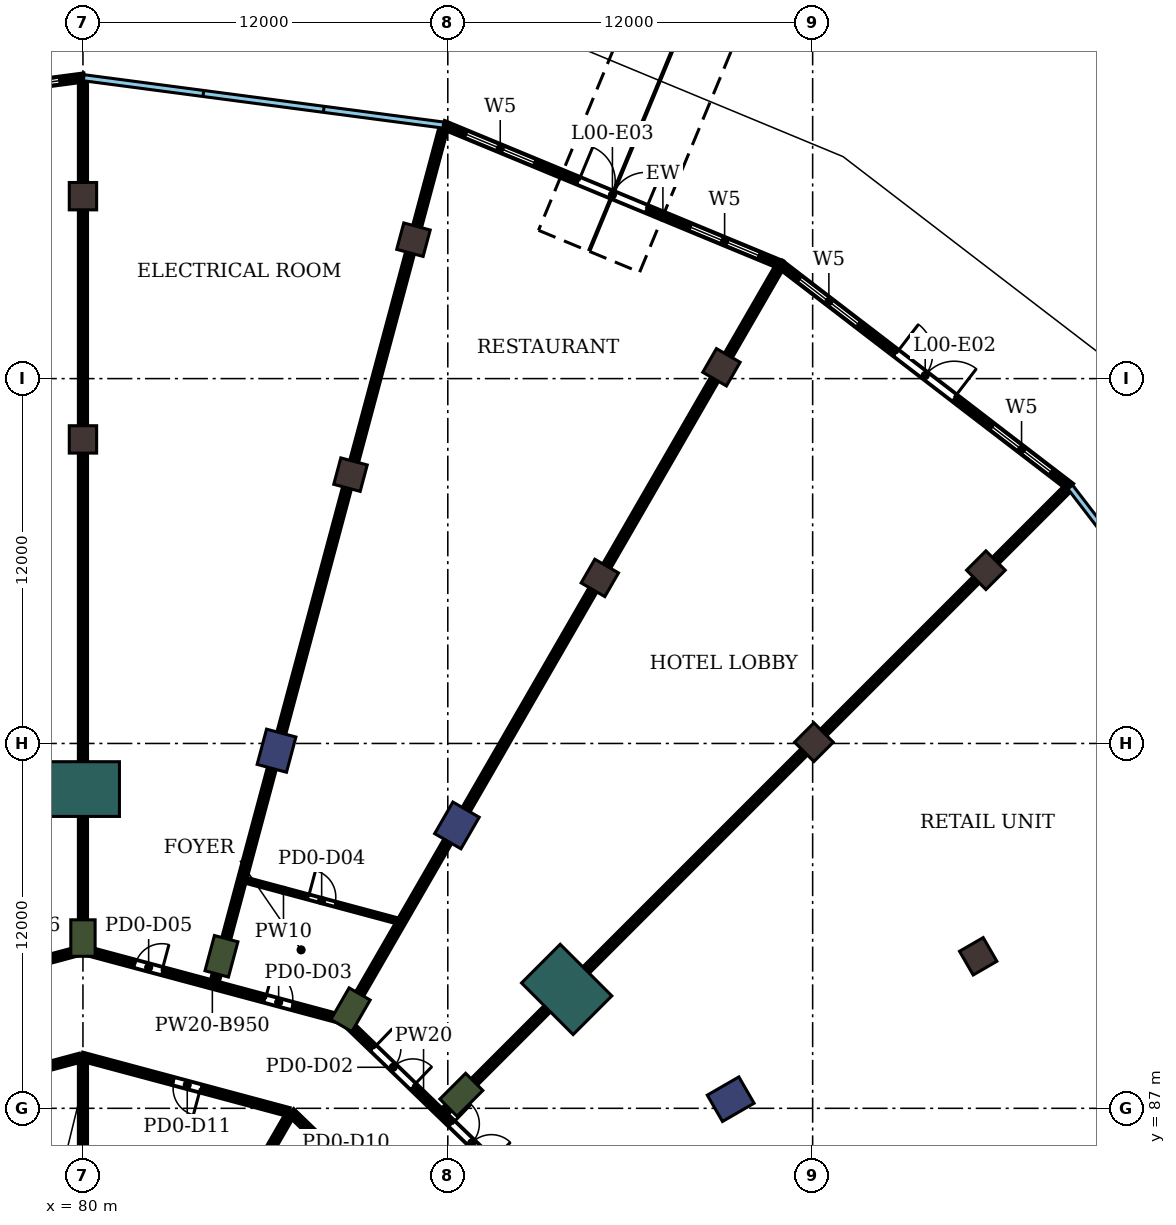
"""IFC4 building model, lengths in metres.
Left out: names, types, materials, properties, quantities, classifications, styles, units other than length and angle.
Written with IfcOpenShell. Run it as: python <this file> out.ifc"""

import sys

from ifc_helpers import new_model, si_unit, direction, frame, frame_2d, origin, origin_2d, place, context, subcontext, project, spatial, rectangle, extrude, element, fill, save


model = new_model("IFC4")
c1 = context("Model", 3, precision=1e-05, world=origin(), true_north=direction((0.0, 1.0)))
c2 = subcontext(c1, "Body", "Model", "MODEL_VIEW")
j1 = project(units=[si_unit("LENGTHUNIT", "METRE"), si_unit("PLANEANGLEUNIT", "RADIAN")], contexts=[c1])
p1 = place(None, origin())
s1 = spatial("IfcSite", under=j1, at=p1, CompositionType="ELEMENT")
p2 = place(p1, origin())
s2 = spatial("IfcBuilding", under=s1, at=p2, CompositionType="ELEMENT")
p3 = place(p2, origin())
s3 = spatial("IfcBuildingStorey", under=s2, at=p3, CompositionType="ELEMENT", Elevation=0.0)
for number, where, z_axis, x_axis in (
    (1, (109.698, 104.698, 0.0), (0.0, 0.0, 1.0), (0.707, 0.707, 0.0)),
    (2, (101.0, 111.373, 0.0), (0.0, 0.0, 1.0), (0.5, 0.866, 0.0)),
    (3, (90.87, 115.569, 0.0), (0.0, 0.0, 1.0), (0.259, 0.966, 0.0)),
    (4, (80.0, 117.0, 0.0), (0.0, 0.0, 1.0), (0.0, 1.0, 0.0)),
    (5, (109.445, 92.0, 0.0), (0.0, 0.0, 1.0), (0.866, 0.5, 0.0)),
    (6, (104.042, 99.042, 0.0), (0.0, 0.0, 1.0), (0.707, 0.707, 0.0)),
    (7, (97.0, 104.445, 0.0), (0.0, 0.0, 1.0), (0.5, 0.866, 0.0)),
    (8, (88.8, 107.842, 0.0), (0.0, 0.0, 1.0), (0.259, 0.966, 0.0)),
    (9, (80.0, 109.0, 0.0), (0.0, 0.0, 1.0), (0.0, 1.0, 0.0)),
):
    element("IfcColumn", number, at=place(p3, frame(where, z_axis=z_axis, x_axis=x_axis)), inside=s3, PredefinedType="COLUMN", context=c2, shape_type="SweptSolid", body=[
        extrude(rectangle(XDim=0.9, YDim=0.9, at=origin_2d()), origin(), (0.0, 0.0, 1.0), 7.0),
    ])
for number, where, z_axis, x_axis in (
    (10, (101.304, 87.3, 0.0), (0.0, 0.0, 1.0), (0.866, 0.5, 0.0)),
    (11, (92.3, 96.304, 0.0), (0.0, 0.0, 1.0), (0.5, 0.866, 0.0)),
    (12, (86.367, 98.762, 0.0), (0.0, 0.0, 1.0), (0.259, 0.966, 0.0)),
):
    element("IfcColumn", number, at=place(p3, frame(where, z_axis=z_axis, x_axis=x_axis)), inside=s3, PredefinedType="COLUMN", context=c2, shape_type="SweptSolid", body=[
        extrude(rectangle(XDim=1.2, YDim=1.0, at=origin_2d()), origin(), (0.0, 0.0, 1.0), 7.0),
    ])
for number, where, z_axis, x_axis in (
    (13, (92.445, 87.445, 0.0), (0.0, 0.0, 1.0), (0.707, 0.707, 0.0)),
    (14, (88.8, 90.242, 0.0), (0.0, 0.0, 1.0), (0.5, 0.866, 0.0)),
    (15, (84.555, 92.0, 0.0), (0.0, 0.0, 1.0), (0.259, 0.966, 0.0)),
    (16, (80.0, 92.6, 0.0), (0.0, 0.0, 1.0), (0.0, 1.0, 0.0)),
):
    element("IfcColumn", number, at=place(p3, frame(where, z_axis=z_axis, x_axis=x_axis)), inside=s3, PredefinedType="COLUMN", context=c2, shape_type="SweptSolid", body=[
        extrude(rectangle(XDim=1.2, YDim=0.8, at=origin_2d()), origin(), (0.0, 0.0, 1.0), 7.0),
    ])
for number, where, z_axis, x_axis in (
    (17, (95.91, 90.91, 0.0), (0.0, 0.0, 1.0), (0.707, 0.707, 0.0)),
    (18, (80.0, 97.5, 0.0), (0.0, 0.0, 1.0), (0.0, 1.0, 0.0)),
):
    element("IfcColumn", number, at=place(p3, frame(where, z_axis=z_axis, x_axis=x_axis)), inside=s3, PredefinedType="COLUMN", context=c2, shape_type="SweptSolid", body=[
        extrude(rectangle(XDim=1.8, YDim=2.4, at=origin_2d()), origin(), (0.0, 0.0, 1.0), 7.0),
    ])
p4 = place(p3, frame((112.456, 107.456, 0.0), z_axis=(0.0, 0.0, 1.0), x_axis=(-0.793357384068, 0.608756159021, 0.0)))
e19 = element("IfcWall", 19, at=p4, inside=s3, PredefinedType="NOTDEFINED", context=c2, shape_type="SweptSolid", body=[
    extrude(rectangle(XDim=11.982, YDim=0.2, at=frame_2d((5.991, 0.0))), origin(), (0.0, 0.0, 1.0), 7.0),
])
p5 = place(p4, frame((0.797, 0.0, 0.9)))
e20 = element("IfcOpeningElement", 20, at=p5, cuts=e19, PredefinedType="OPENING", context=c2, shape_type="SweptSolid", body=[
    extrude(rectangle(XDim=2.4, YDim=3.6, at=frame_2d((1.2, 1.8))), frame((0.0, 0.11, 0.0), z_axis=(0.0, -1.0, 0.0), x_axis=(1.0, 0.0, 0.0)), (0.0, 0.0, 1.0), 0.22),
])
p6 = place(p4, frame((4.791, 0.0, 0.0)))
e21 = element("IfcOpeningElement", 21, at=p6, cuts=e19, PredefinedType="OPENING", context=c2, shape_type="SweptSolid", body=[
    extrude(rectangle(XDim=2.4, YDim=2.7, at=frame_2d((1.2, 1.35))), frame((0.0, 0.11, 0.0), z_axis=(0.0, -1.0, 0.0), x_axis=(1.0, 0.0, 0.0)), (0.0, 0.0, 1.0), 0.22),
])
p7 = place(p4, frame((8.785, 0.0, 0.9)))
e22 = element("IfcOpeningElement", 22, at=p7, cuts=e19, PredefinedType="OPENING", context=c2, shape_type="SweptSolid", body=[
    extrude(rectangle(XDim=2.4, YDim=3.6, at=frame_2d((1.2, 1.8))), frame((0.0, 0.11, 0.0), z_axis=(0.0, -1.0, 0.0), x_axis=(1.0, 0.0, 0.0)), (0.0, 0.0, 1.0), 0.22),
])
p8 = place(p3, frame((102.949, 114.75, 0.0), z_axis=(0.0, 0.0, 1.0), x_axis=(-0.923874283273, 0.382696104901, 0.0)))
e23 = element("IfcWall", 23, at=p8, inside=s3, PredefinedType="NOTDEFINED", context=c2, shape_type="SweptSolid", body=[
    extrude(rectangle(XDim=11.982, YDim=0.2, at=frame_2d((5.991, 0.0))), origin(), (0.0, 0.0, 1.0), 7.0),
])
p9 = place(p8, frame((0.797, 0.0, 0.9)))
e24 = element("IfcOpeningElement", 24, at=p9, cuts=e23, PredefinedType="OPENING", context=c2, shape_type="SweptSolid", body=[
    extrude(rectangle(XDim=2.4, YDim=3.6, at=frame_2d((1.2, 1.8))), frame((0.0, 0.11, 0.0), z_axis=(0.0, -1.0, 0.0), x_axis=(1.0, 0.0, 0.0)), (0.0, 0.0, 1.0), 0.22),
])
p10 = place(p8, frame((4.791, 0.0, 0.0)))
e25 = element("IfcOpeningElement", 25, at=p10, cuts=e23, PredefinedType="OPENING", context=c2, shape_type="SweptSolid", body=[
    extrude(rectangle(XDim=2.4, YDim=2.7, at=frame_2d((1.2, 1.35))), frame((0.0, 0.11, 0.0), z_axis=(0.0, -1.0, 0.0), x_axis=(1.0, 0.0, 0.0)), (0.0, 0.0, 1.0), 0.22),
])
p11 = place(p8, frame((8.785, 0.0, 0.9)))
e26 = element("IfcOpeningElement", 26, at=p11, cuts=e23, PredefinedType="OPENING", context=c2, shape_type="SweptSolid", body=[
    extrude(rectangle(XDim=2.4, YDim=3.6, at=frame_2d((1.2, 1.8))), frame((0.0, 0.11, 0.0), z_axis=(0.0, -1.0, 0.0), x_axis=(1.0, 0.0, 0.0)), (0.0, 0.0, 1.0), 0.22),
])
p12 = place(p3, frame((80.0, 120.899, 0.0), z_axis=(0.0, 0.0, 1.0), x_axis=(-0.991445069361, -0.130524612391, 0.0)))
e27 = element("IfcWall", 27, at=p12, inside=s3, PredefinedType="NOTDEFINED", context=c2, shape_type="SweptSolid", body=[
    extrude(rectangle(XDim=11.982, YDim=0.2, at=frame_2d((5.991, 0.0))), origin(), (0.0, 0.0, 1.0), 7.0),
])
p13 = place(p12, frame((0.797, 0.0, 0.9)))
e28 = element("IfcOpeningElement", 28, at=p13, cuts=e27, PredefinedType="OPENING", context=c2, shape_type="SweptSolid", body=[
    extrude(rectangle(XDim=2.4, YDim=3.6, at=frame_2d((1.2, 1.8))), frame((0.0, 0.11, 0.0), z_axis=(0.0, -1.0, 0.0), x_axis=(1.0, 0.0, 0.0)), (0.0, 0.0, 1.0), 0.22),
])
p14 = place(p12, frame((4.791, 0.0, 0.0)))
e29 = element("IfcOpeningElement", 29, at=p14, cuts=e27, PredefinedType="OPENING", context=c2, shape_type="SweptSolid", body=[
    extrude(rectangle(XDim=2.4, YDim=2.7, at=frame_2d((1.2, 1.35))), frame((0.0, 0.11, 0.0), z_axis=(0.0, -1.0, 0.0), x_axis=(1.0, 0.0, 0.0)), (0.0, 0.0, 1.0), 0.22),
])
p15 = place(p12, frame((8.785, 0.0, 0.9)))
e30 = element("IfcOpeningElement", 30, at=p15, cuts=e27, PredefinedType="OPENING", context=c2, shape_type="SweptSolid", body=[
    extrude(rectangle(XDim=2.4, YDim=3.6, at=frame_2d((1.2, 1.8))), frame((0.0, 0.11, 0.0), z_axis=(0.0, -1.0, 0.0), x_axis=(1.0, 0.0, 0.0)), (0.0, 0.0, 1.0), 0.22),
])
p16 = place(p3, frame((71.411, 89.908, 0.0), z_axis=(0.0, 0.0, 1.0), x_axis=(0.965907314361, 0.258888122678, 0.0)))
e31 = element("IfcWall", 31, at=p16, inside=s3, PredefinedType="PARTITIONING", context=c2, shape_type="SweptSolid", body=[
    extrude(rectangle(XDim=8.802, YDim=0.2, at=frame_2d((4.401, 0.0))), origin(), (0.0, 0.0, 1.0), 6.05),
])
p17 = place(p16, frame((5.755, 0.0, 0.0)))
e32 = element("IfcOpeningElement", 32, at=p17, cuts=e31, PredefinedType="OPENING", context=c2, shape_type="SweptSolid", body=[
    extrude(rectangle(XDim=1.8, YDim=2.1, at=frame_2d((0.9, 1.05))), frame((0.0, 0.11, 0.0), z_axis=(0.0, -1.0, 0.0), x_axis=(1.0, 0.0, 0.0)), (0.0, 0.0, 1.0), 0.22),
])
p18 = place(p16, frame((1.779, 0.0, 0.0)))
e33 = element("IfcOpeningElement", 33, at=p18, cuts=e31, PredefinedType="OPENING", context=c2, shape_type="SweptSolid", body=[
    extrude(rectangle(XDim=0.9, YDim=2.1, at=frame_2d((0.45, 1.05))), frame((0.0, 0.11, 0.0), z_axis=(0.0, -1.0, 0.0), x_axis=(1.0, 0.0, 0.0)), (0.0, 0.0, 1.0), 0.22),
])
p19 = place(p3, frame((73.284, 86.891, 0.0), z_axis=(0.0, 0.0, 1.0), x_axis=(0.965937351185, 0.258776029775, 0.0)))
e34 = element("IfcWall", 34, at=p19, inside=s3, PredefinedType="PARTITIONING", context=c2, shape_type="SweptSolid", body=[
    extrude(rectangle(XDim=6.823, YDim=0.2, at=frame_2d((3.412, 0.0))), origin(), (0.0, 0.0, 1.0), 6.55),
])
p20 = place(p19, frame((2.951, 0.0, 0.0)))
e35 = element("IfcOpeningElement", 35, at=p20, cuts=e34, PredefinedType="OPENING", context=c2, shape_type="SweptSolid", body=[
    extrude(rectangle(XDim=0.9, YDim=2.1, at=frame_2d((0.45, 1.05))), frame((0.0, 0.11, 0.0), z_axis=(0.0, -1.0, 0.0), x_axis=(1.0, 0.0, 0.0)), (0.0, 0.0, 1.0), 0.22),
])
p21 = place(p3, frame((80.0, 82.699, 0.0), z_axis=(0.0, 0.0, 1.0), x_axis=(0.0, 1.0, 0.0)))
e36 = element("IfcWall", 36, at=p21, inside=s3, PredefinedType="PARTITIONING", context=c2, shape_type="SweptSolid", body=[
    extrude(rectangle(XDim=5.861, YDim=0.2, at=frame_2d((2.931, 0.0))), origin(), (0.0, 0.0, 1.0), 6.55),
])
p22 = place(p3, frame((80.0, 88.69, 0.0), z_axis=(0.0, 0.0, 1.0), x_axis=(0.965929896633, -0.258803853893, 0.0)))
e37 = element("IfcWall", 37, at=p22, inside=s3, PredefinedType="PARTITIONING", context=c2, shape_type="SweptSolid", body=[
    extrude(rectangle(XDim=6.963, YDim=0.2, at=frame_2d((3.481, 0.0))), origin(), (0.0, 0.0, 1.0), 6.55),
])
p23 = place(p22, frame((3.102, 0.0, 0.0)))
e38 = element("IfcOpeningElement", 38, at=p23, cuts=e37, PredefinedType="OPENING", context=c2, shape_type="SweptSolid", body=[
    extrude(rectangle(XDim=0.9, YDim=2.1, at=frame_2d((0.45, 1.05))), frame((0.0, 0.11, 0.0), z_axis=(0.0, -1.0, 0.0), x_axis=(1.0, 0.0, 0.0)), (0.0, 0.0, 1.0), 0.22),
])
p24 = place(p3, frame((80.0, 92.3, 0.0), z_axis=(0.0, 0.0, 1.0), x_axis=(0.0, 1.0, 0.0)))
e39 = element("IfcWall", 39, at=p24, inside=s3, PredefinedType="PARTITIONING", context=c2, shape_type="SweptSolid", body=[
    extrude(rectangle(XDim=28.498, YDim=0.2, at=frame_2d((14.249, 0.0))), origin(), (0.0, 0.0, 1.0), 5.65),
])
p25 = place(p3, frame((80.0, 92.21, 0.0), z_axis=(0.0, 0.0, 1.0), x_axis=(0.965910452724, -0.258876413213, 0.0)))
e40 = element("IfcWall", 40, at=p25, inside=s3, PredefinedType="PARTITIONING", context=c2, shape_type="SweptSolid", body=[
    extrude(rectangle(XDim=8.812, YDim=0.2, at=frame_2d((4.406, 0.0))), origin(), (0.0, 0.0, 1.0), 6.05),
])
p26 = place(p25, frame((6.213, 0.0, 0.0)))
e41 = element("IfcOpeningElement", 41, at=p26, cuts=e40, PredefinedType="OPENING", context=c2, shape_type="SweptSolid", body=[
    extrude(rectangle(XDim=0.9, YDim=2.1, at=frame_2d((0.45, 1.05))), frame((0.0, 0.11, 0.0), z_axis=(0.0, -1.0, 0.0), x_axis=(1.0, 0.0, 0.0)), (0.0, 0.0, 1.0), 0.22),
])
p27 = place(p25, frame((1.787, 0.0, 0.0)))
e42 = element("IfcOpeningElement", 42, at=p27, cuts=e40, PredefinedType="OPENING", context=c2, shape_type="SweptSolid", body=[
    extrude(rectangle(XDim=0.9, YDim=2.1, at=frame_2d((0.45, 1.05))), frame((0.0, 0.11, 0.0), z_axis=(0.0, -1.0, 0.0), x_axis=(1.0, 0.0, 0.0)), (0.0, 0.0, 1.0), 0.22),
])
p28 = place(p3, frame((83.85, 81.667, 0.0), z_axis=(0.0, 0.0, 1.0), x_axis=(0.500029580911, 0.866008324564, 0.0)))
e43 = element("IfcWall", 43, at=p28, inside=s3, PredefinedType="PARTITIONING", context=c2, shape_type="SweptSolid", body=[
    extrude(rectangle(XDim=5.872, YDim=0.2, at=frame_2d((2.936, 0.0))), origin(), (0.0, 0.0, 1.0), 6.55),
])
p29 = place(p3, frame((84.33, 91.153, 0.0), z_axis=(0.0, 0.0, 1.0), x_axis=(0.258902156378, 0.965903552858, 0.0)))
e44 = element("IfcWall", 44, at=p29, inside=s3, PredefinedType="PARTITIONING", context=c2, shape_type="SweptSolid", body=[
    extrude(rectangle(XDim=29.074, YDim=0.2, at=frame_2d((14.537, 0.0))), origin(), (0.0, 0.0, 1.0), 5.65),
])
p30 = place(p3, frame((86.861, 86.852, 0.0), z_axis=(0.0, 0.0, 1.0), x_axis=(0.719448855188, -0.694545423114, 0.0)))
e45 = element("IfcWall", 45, at=p30, inside=s3, PredefinedType="PARTITIONING", context=c2, shape_type="SweptSolid", body=[
    extrude(rectangle(XDim=4.97, YDim=0.2, at=frame_2d((2.485, 0.0))), origin(), (0.0, 0.0, 1.0), 6.55),
])
p31 = place(p30, frame((2.035, 0.0, 0.0)))
e46 = element("IfcOpeningElement", 46, at=p31, cuts=e45, PredefinedType="OPENING", context=c2, shape_type="SweptSolid", body=[
    extrude(rectangle(XDim=0.9, YDim=2.1, at=frame_2d((0.45, 1.05))), frame((0.0, 0.11, 0.0), z_axis=(0.0, -1.0, 0.0), x_axis=(1.0, 0.0, 0.0)), (0.0, 0.0, 1.0), 0.22),
])
p32 = place(p3, frame((88.668, 89.832, 0.0), z_axis=(0.0, 0.0, 1.0), x_axis=(0.71956091863, -0.694429322811, 0.0)))
e47 = element("IfcWall", 47, at=p32, inside=s3, PredefinedType="PARTITIONING", context=c2, shape_type="SweptSolid", body=[
    extrude(rectangle(XDim=7.043, YDim=0.2, at=frame_2d((3.521, 0.0))), origin(), (0.0, 0.0, 1.0), 6.55),
])
p33 = place(p32, frame((4.821, 0.0, 0.0)))
e48 = element("IfcOpeningElement", 48, at=p33, cuts=e47, PredefinedType="OPENING", context=c2, shape_type="SweptSolid", body=[
    extrude(rectangle(XDim=1.8, YDim=2.1, at=frame_2d((0.9, 1.05))), frame((0.0, 0.11, 0.0), z_axis=(0.0, -1.0, 0.0), x_axis=(1.0, 0.0, 0.0)), (0.0, 0.0, 1.0), 0.22),
])
p34 = place(p32, frame((1.234, 0.0, 0.0)))
e49 = element("IfcOpeningElement", 49, at=p34, cuts=e47, PredefinedType="OPENING", context=c2, shape_type="SweptSolid", body=[
    extrude(rectangle(XDim=1.8, YDim=2.1, at=frame_2d((0.9, 1.05))), frame((0.0, 0.11, 0.0), z_axis=(0.0, -1.0, 0.0), x_axis=(1.0, 0.0, 0.0)), (0.0, 0.0, 1.0), 0.22),
])
p35 = place(p3, frame((88.602, 89.897, 0.0), z_axis=(0.0, 0.0, 1.0), x_axis=(0.500041462516, 0.866001464066, 0.0)))
e50 = element("IfcWall", 50, at=p35, inside=s3, PredefinedType="PARTITIONING", context=c2, shape_type="SweptSolid", body=[
    extrude(rectangle(XDim=28.596, YDim=0.2, at=frame_2d((14.298, 0.0))), origin(), (0.0, 0.0, 1.0), 5.65),
])
p36 = place(p3, frame((91.876, 86.876, 0.0), z_axis=(0.0, 0.0, 1.0), x_axis=(0.707106781187, 0.707106781187, 0.0)))
e51 = element("IfcWall", 51, at=p36, inside=s3, PredefinedType="PARTITIONING", context=c2, shape_type="SweptSolid", body=[
    extrude(rectangle(XDim=29.004, YDim=0.2, at=frame_2d((14.502, 0.0))), origin(), (0.0, 0.0, 1.0), 5.65),
])
p37 = place(p3, frame((85.34, 94.506, 0.0), z_axis=(0.0, 0.0, 1.0), x_axis=(0.965895847634, -0.258930901058, 0.0)))
e52 = element("IfcWall", 52, at=p37, inside=s3, PredefinedType="PARTITIONING", context=c2, shape_type="SweptSolid", body=[
    extrude(rectangle(XDim=5.199, YDim=0.1, at=frame_2d((2.6, 0.0))), origin(), (0.0, 0.0, 1.0), 6.55),
])
p38 = place(p37, frame((2.149, 0.0, 0.0)))
e53 = element("IfcOpeningElement", 53, at=p38, cuts=e52, PredefinedType="OPENING", context=c2, shape_type="SweptSolid", body=[
    extrude(rectangle(XDim=0.9, YDim=2.1, at=frame_2d((0.45, 1.05))), frame((0.0, 0.06, 0.0), z_axis=(0.0, -1.0, 0.0), x_axis=(1.0, 0.0, 0.0)), (0.0, 0.0, 1.0), 0.12),
])
p39 = place(p5, origin())
e54 = element("IfcWindow", 54, at=p39, inside=s3, PartitioningType="SINGLE_PANEL", PredefinedType="WINDOW", context=c2, shape_type="SweptSolid", body=[
    extrude(rectangle(XDim=2.4, YDim=3.6, at=frame_2d((1.2, 1.8))), frame((0.0, 0.03, 0.0), z_axis=(0.0, -1.0, 0.0), x_axis=(1.0, 0.0, 0.0)), (0.0, 0.0, 1.0), 0.06),
])
fill(e20, e54)
p40 = place(p6, frame((2.4, 0.0, 0.0), z_axis=(0.0, 0.0, 1.0), x_axis=(-1.0, 0.0, 0.0)))
e55 = element("IfcDoor", 55, at=p40, inside=s3, OperationType="DOUBLE_DOOR_SINGLE_SWING", PredefinedType="DOOR", context=c2, shape_type="SweptSolid", body=[
    extrude(rectangle(XDim=2.4, YDim=2.7, at=frame_2d((1.2, 1.35))), frame((0.0, 0.025, 0.0), z_axis=(0.0, -1.0, 0.0), x_axis=(1.0, 0.0, 0.0)), (0.0, 0.0, 1.0), 0.05),
])
fill(e21, e55)
p41 = place(p7, origin())
e56 = element("IfcWindow", 56, at=p41, inside=s3, PartitioningType="SINGLE_PANEL", PredefinedType="WINDOW", context=c2, shape_type="SweptSolid", body=[
    extrude(rectangle(XDim=2.4, YDim=3.6, at=frame_2d((1.2, 1.8))), frame((0.0, 0.03, 0.0), z_axis=(0.0, -1.0, 0.0), x_axis=(1.0, 0.0, 0.0)), (0.0, 0.0, 1.0), 0.06),
])
fill(e22, e56)
p42 = place(p9, origin())
e57 = element("IfcWindow", 57, at=p42, inside=s3, PartitioningType="SINGLE_PANEL", PredefinedType="WINDOW", context=c2, shape_type="SweptSolid", body=[
    extrude(rectangle(XDim=2.4, YDim=3.6, at=frame_2d((1.2, 1.8))), frame((0.0, 0.03, 0.0), z_axis=(0.0, -1.0, 0.0), x_axis=(1.0, 0.0, 0.0)), (0.0, 0.0, 1.0), 0.06),
])
fill(e24, e57)
p43 = place(p10, frame((2.4, 0.0, 0.0), z_axis=(0.0, 0.0, 1.0), x_axis=(-1.0, 0.0, 0.0)))
e58 = element("IfcDoor", 58, at=p43, inside=s3, OperationType="DOUBLE_DOOR_SINGLE_SWING", PredefinedType="DOOR", context=c2, shape_type="SweptSolid", body=[
    extrude(rectangle(XDim=2.4, YDim=2.7, at=frame_2d((1.2, 1.35))), frame((0.0, 0.025, 0.0), z_axis=(0.0, -1.0, 0.0), x_axis=(1.0, 0.0, 0.0)), (0.0, 0.0, 1.0), 0.05),
])
fill(e25, e58)
p44 = place(p11, origin())
e59 = element("IfcWindow", 59, at=p44, inside=s3, PartitioningType="SINGLE_PANEL", PredefinedType="WINDOW", context=c2, shape_type="SweptSolid", body=[
    extrude(rectangle(XDim=2.4, YDim=3.6, at=frame_2d((1.2, 1.8))), frame((0.0, 0.03, 0.0), z_axis=(0.0, -1.0, 0.0), x_axis=(1.0, 0.0, 0.0)), (0.0, 0.0, 1.0), 0.06),
])
fill(e26, e59)
p45 = place(p13, origin())
e60 = element("IfcWindow", 60, at=p45, inside=s3, PartitioningType="SINGLE_PANEL", PredefinedType="WINDOW", context=c2, shape_type="SweptSolid", body=[
    extrude(rectangle(XDim=2.4, YDim=3.6, at=frame_2d((1.2, 1.8))), frame((0.0, 0.03, 0.0), z_axis=(0.0, -1.0, 0.0), x_axis=(1.0, 0.0, 0.0)), (0.0, 0.0, 1.0), 0.06),
])
fill(e28, e60)
p46 = place(p33, origin())
e61 = element("IfcDoor", 61, at=p46, inside=s3, OperationType="DOUBLE_DOOR_SINGLE_SWING", PredefinedType="DOOR", context=c2, shape_type="SweptSolid", body=[
    extrude(rectangle(XDim=1.8, YDim=2.1, at=frame_2d((0.9, 1.05))), frame((0.0, 0.025, 0.0), z_axis=(0.0, -1.0, 0.0), x_axis=(1.0, 0.0, 0.0)), (0.0, 0.0, 1.0), 0.05),
])
fill(e48, e61)
p47 = place(p34, origin())
e62 = element("IfcDoor", 62, at=p47, inside=s3, OperationType="DOUBLE_DOOR_SINGLE_SWING", PredefinedType="DOOR", context=c2, shape_type="SweptSolid", body=[
    extrude(rectangle(XDim=1.8, YDim=2.1, at=frame_2d((0.9, 1.05))), frame((0.0, 0.025, 0.0), z_axis=(0.0, -1.0, 0.0), x_axis=(1.0, 0.0, 0.0)), (0.0, 0.0, 1.0), 0.05),
])
fill(e49, e62)
p48 = place(p26, origin())
e63 = element("IfcDoor", 63, at=p48, inside=s3, OperationType="SINGLE_SWING_LEFT", PredefinedType="DOOR", context=c2, shape_type="SweptSolid", body=[
    extrude(rectangle(XDim=0.9, YDim=2.1, at=frame_2d((0.45, 1.05))), frame((0.0, 0.025, 0.0), z_axis=(0.0, -1.0, 0.0), x_axis=(1.0, 0.0, 0.0)), (0.0, 0.0, 1.0), 0.05),
])
fill(e41, e63)
p49 = place(p38, origin())
e64 = element("IfcDoor", 64, at=p49, inside=s3, OperationType="SINGLE_SWING_LEFT", PredefinedType="DOOR", context=c2, shape_type="SweptSolid", body=[
    extrude(rectangle(XDim=0.9, YDim=2.1, at=frame_2d((0.45, 1.05))), frame((0.0, 0.025, 0.0), z_axis=(0.0, -1.0, 0.0), x_axis=(1.0, 0.0, 0.0)), (0.0, 0.0, 1.0), 0.05),
])
fill(e53, e64)
p50 = place(p27, origin())
e65 = element("IfcDoor", 65, at=p50, inside=s3, OperationType="SINGLE_SWING_RIGHT", PredefinedType="DOOR", context=c2, shape_type="SweptSolid", body=[
    extrude(rectangle(XDim=0.9, YDim=2.1, at=frame_2d((0.45, 1.05))), frame((0.0, 0.025, 0.0), z_axis=(0.0, -1.0, 0.0), x_axis=(1.0, 0.0, 0.0)), (0.0, 0.0, 1.0), 0.05),
])
fill(e42, e65)
p51 = place(p23, frame((0.9, 0.0, 0.0), z_axis=(0.0, 0.0, 1.0), x_axis=(-1.0, 0.0, 0.0)))
e66 = element("IfcDoor", 66, at=p51, inside=s3, OperationType="SINGLE_SWING_LEFT", PredefinedType="DOOR", context=c2, shape_type="SweptSolid", body=[
    extrude(rectangle(XDim=0.9, YDim=2.1, at=frame_2d((0.45, 1.05))), frame((0.0, 0.025, 0.0), z_axis=(0.0, -1.0, 0.0), x_axis=(1.0, 0.0, 0.0)), (0.0, 0.0, 1.0), 0.05),
])
fill(e38, e66)
save(model, sys.argv[1])
